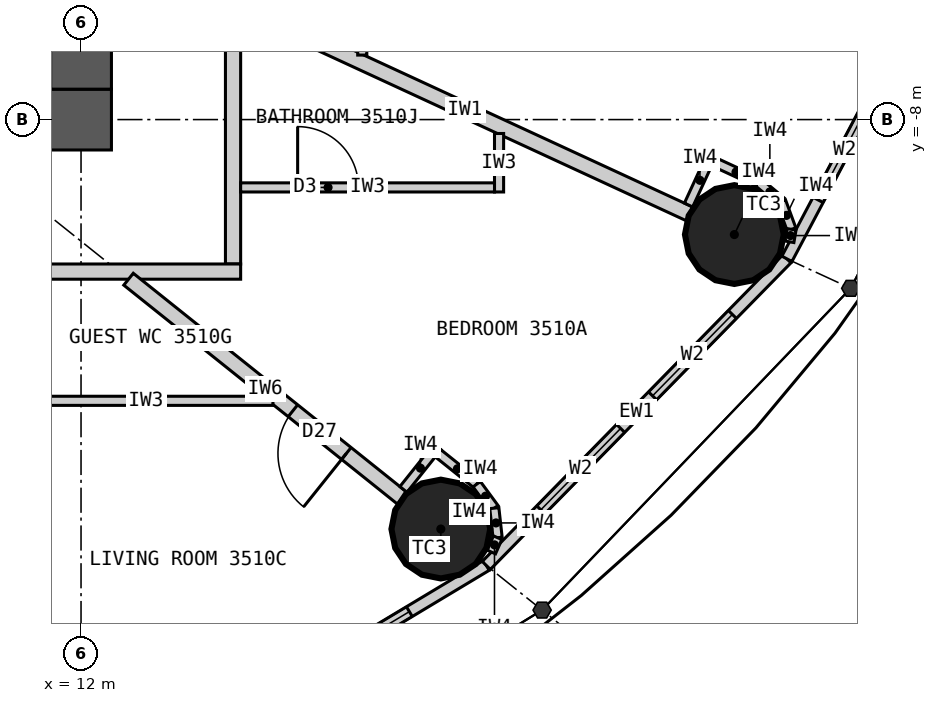
"""IFC4 building model, lengths in metres.
Left out: names, types, materials, properties, quantities, classifications, styles, units other than length and angle.
Written with IfcOpenShell. Run it as: python <this file> out.ifc"""

import sys

from ifc_helpers import new_model, si_unit, direction, frame, frame_2d, origin, origin_2d, place, context, subcontext, project, spatial, rectangle, circle, extrude, clip, halfspace, element, fill, save


model = new_model("IFC4")
c1 = context("Model", 3, precision=1e-05, world=origin(), true_north=direction((0.0, 1.0)))
c2 = subcontext(c1, "Body", "Model", "MODEL_VIEW")
j1 = project(units=[si_unit("LENGTHUNIT", "METRE"), si_unit("PLANEANGLEUNIT", "RADIAN")], contexts=[c1])
p1 = place(None, origin())
s1 = spatial("IfcSite", under=j1, at=p1, CompositionType="ELEMENT")
p2 = place(p1, origin())
s2 = spatial("IfcBuilding", under=s1, at=p2, CompositionType="ELEMENT")
p3 = place(p2, frame((0.0, 0.0, 135.3)))
s3 = spatial("IfcBuildingStorey", under=s2, at=p3, CompositionType="ELEMENT", Elevation=135.3)
for number, where, z_axis, x_axis in (
    (1, (16.734, -13.387, 0.0), (0.0, 0.0, 1.0), (1.0, 0.0, 0.0)),
    (2, (20.596, -9.513, 0.0), (0.0, 0.0, 1.0), (1.0, 0.0, 0.0)),
):
    element("IfcColumn", number, at=place(p3, frame(where, z_axis=z_axis, x_axis=x_axis)), inside=s3, PredefinedType="COLUMN", context=c2, shape_type="Clipping", body=[
        clip(extrude(circle(Radius=0.65, at=origin_2d()), origin(), (0.0, 0.0, 1.0), 3.3), halfspace(frame((0.0, 0.0, 2.25), z_axis=(0.0, 0.0, 1.0), x_axis=(1.0, 0.0, 0.0)), False)),
    ])
p4 = place(p3, frame((12.4, -8.0, 0.0), z_axis=(0.0, 0.0, 1.0), x_axis=(-1.0, 0.0, 0.0)))
e3 = element("IfcWall", 3, at=p4, inside=s3, PredefinedType="SHEAR", context=c2, shape_type="SweptSolid", body=[
    extrude(rectangle(XDim=24.8, YDim=0.8, at=frame_2d((12.4, 0.0))), origin(), (0.0, 0.0, 1.0), 3.3),
])
p5 = place(p4, frame((11.1, 0.0, 0.0)))
e4 = element("IfcOpeningElement", 4, at=p5, cuts=e3, PredefinedType="OPENING", context=c2, shape_type="SweptSolid", body=[
    extrude(rectangle(XDim=1.2, YDim=2.2, at=frame_2d((0.6, 1.1))), frame((0.0, 0.41, 0.0), z_axis=(0.0, -1.0, 0.0), x_axis=(1.0, 0.0, 0.0)), (0.0, 0.0, 1.0), 0.82),
])
p6 = place(p4, frame((18.7, 0.0, 0.0)))
e5 = element("IfcOpeningElement", 5, at=p6, cuts=e3, PredefinedType="OPENING", context=c2, shape_type="SweptSolid", body=[
    extrude(rectangle(XDim=0.9, YDim=2.2, at=frame_2d((0.45, 1.1))), frame((0.0, 0.41, 0.0), z_axis=(0.0, -1.0, 0.0), x_axis=(1.0, 0.0, 0.0)), (0.0, 0.0, 1.0), 0.82),
])
p7 = place(p3, frame((12.0, -7.6, 0.0), z_axis=(0.0, 0.0, 1.0), x_axis=(0.0, 1.0, 0.0)))
e6 = element("IfcWall", 6, at=p7, inside=s3, PredefinedType="SHEAR", context=c2, shape_type="SweptSolid", body=[
    extrude(rectangle(XDim=15.2, YDim=0.8, at=frame_2d((7.6, 0.0))), origin(), (0.0, 0.0, 1.0), 3.3),
])
p8 = place(p7, frame((6.7, 0.0, 0.0)))
e7 = element("IfcOpeningElement", 7, at=p8, cuts=e6, PredefinedType="OPENING", context=c2, shape_type="SweptSolid", body=[
    extrude(rectangle(XDim=1.8, YDim=2.2, at=frame_2d((0.9, 1.1))), frame((0.0, 0.41, 0.0), z_axis=(0.0, -1.0, 0.0), x_axis=(1.0, 0.0, 0.0)), (0.0, 0.0, 1.0), 0.82),
])
p9 = place(p3, frame((12.221, -16.935, 0.0), z_axis=(0.0, 0.0, 1.0), x_axis=(0.857308573723, 0.514802884044, 0.0)))
e8 = element("IfcWall", 8, at=p9, inside=s3, PredefinedType="ELEMENTEDWALL", context=c2, shape_type="SweptSolid", body=[
    extrude(rectangle(XDim=5.961, YDim=0.15, at=frame_2d((2.98, 0.0))), origin(), (0.0, 0.0, 1.0), 3.05),
])
p10 = place(p9, frame((1.181, 0.0, 0.9)))
e9 = element("IfcOpeningElement", 9, at=p10, cuts=e8, PredefinedType="OPENING", context=c2, shape_type="SweptSolid", body=[
    extrude(rectangle(XDim=1.5, YDim=1.9, at=frame_2d((0.75, 0.95))), frame((0.0, 0.085, 0.0), z_axis=(0.0, -1.0, 0.0), x_axis=(1.0, 0.0, 0.0)), (0.0, 0.0, 1.0), 0.17),
])
p11 = place(p9, frame((3.281, 0.0, 0.9)))
e10 = element("IfcOpeningElement", 10, at=p11, cuts=e8, PredefinedType="OPENING", context=c2, shape_type="SweptSolid", body=[
    extrude(rectangle(XDim=1.5, YDim=1.9, at=frame_2d((0.75, 0.95))), frame((0.0, 0.085, 0.0), z_axis=(0.0, -1.0, 0.0), x_axis=(1.0, 0.0, 0.0)), (0.0, 0.0, 1.0), 0.17),
])
p12 = place(p3, frame((17.332, -13.866, 0.0), z_axis=(0.0, 0.0, 1.0), x_axis=(0.700136650834, 0.714008872605, 0.0)))
e11 = element("IfcWall", 11, at=p12, inside=s3, PredefinedType="ELEMENTEDWALL", context=c2, shape_type="SweptSolid", body=[
    extrude(rectangle(XDim=5.649, YDim=0.15, at=frame_2d((2.825, 0.0))), origin(), (0.0, 0.0, 1.0), 3.05),
])
p13 = place(p12, frame((1.025, 0.0, 0.9)))
e12 = element("IfcOpeningElement", 12, at=p13, cuts=e11, PredefinedType="OPENING", context=c2, shape_type="SweptSolid", body=[
    extrude(rectangle(XDim=1.5, YDim=1.9, at=frame_2d((0.75, 0.95))), frame((0.0, 0.085, 0.0), z_axis=(0.0, -1.0, 0.0), x_axis=(1.0, 0.0, 0.0)), (0.0, 0.0, 1.0), 0.17),
])
p14 = place(p12, frame((3.125, 0.0, 0.9)))
e13 = element("IfcOpeningElement", 13, at=p14, cuts=e11, PredefinedType="OPENING", context=c2, shape_type="SweptSolid", body=[
    extrude(rectangle(XDim=1.5, YDim=1.9, at=frame_2d((0.75, 0.95))), frame((0.0, 0.085, 0.0), z_axis=(0.0, -1.0, 0.0), x_axis=(1.0, 0.0, 0.0)), (0.0, 0.0, 1.0), 0.17),
])
p15 = place(p3, frame((21.287, -9.832, 0.0), z_axis=(0.0, 0.0, 1.0), x_axis=(0.467814388454, 0.883826735257, 0.0)))
e14 = element("IfcWall", 14, at=p15, inside=s3, PredefinedType="ELEMENTEDWALL", context=c2, shape_type="SweptSolid", body=[
    extrude(rectangle(XDim=5.354, YDim=0.15, at=frame_2d((2.677, 0.0))), origin(), (0.0, 0.0, 1.0), 3.05),
])
p16 = place(p15, frame((0.877, 0.0, 0.9)))
e15 = element("IfcOpeningElement", 15, at=p16, cuts=e14, PredefinedType="OPENING", context=c2, shape_type="SweptSolid", body=[
    extrude(rectangle(XDim=1.5, YDim=1.9, at=frame_2d((0.75, 0.95))), frame((0.0, 0.085, 0.0), z_axis=(0.0, -1.0, 0.0), x_axis=(1.0, 0.0, 0.0)), (0.0, 0.0, 1.0), 0.17),
])
p17 = place(p15, frame((2.977, 0.0, 0.9)))
e16 = element("IfcOpeningElement", 16, at=p17, cuts=e14, PredefinedType="OPENING", context=c2, shape_type="SweptSolid", body=[
    extrude(rectangle(XDim=1.5, YDim=1.9, at=frame_2d((0.75, 0.95))), frame((0.0, 0.085, 0.0), z_axis=(0.0, -1.0, 0.0), x_axis=(1.0, 0.0, 0.0)), (0.0, 0.0, 1.0), 0.17),
])
p18 = place(p3, frame((14.0, -9.9, 0.0), z_axis=(0.0, 0.0, 1.0), x_axis=(0.0, 1.0, 0.0)))
e17 = element("IfcWall", 17, at=p18, inside=s3, PredefinedType="PARTITIONING", context=c2, shape_type="SweptSolid", body=[
    extrude(rectangle(XDim=19.8, YDim=0.2, at=frame_2d((9.9, 0.0))), origin(), (0.0, 0.0, 1.0), 3.05),
])
p19 = place(p18, frame((4.948, 0.0, 0.0)))
e18 = element("IfcOpeningElement", 18, at=p19, cuts=e17, PredefinedType="OPENING", context=c2, shape_type="SweptSolid", body=[
    extrude(rectangle(XDim=1.0, YDim=2.2, at=frame_2d((0.5, 1.1))), frame((0.0, 0.11, 0.0), z_axis=(0.0, -1.0, 0.0), x_axis=(1.0, 0.0, 0.0)), (0.0, 0.0, 1.0), 0.22),
])
p20 = place(p18, frame((18.641, 0.0, 0.0)))
e19 = element("IfcOpeningElement", 19, at=p20, cuts=e17, PredefinedType="OPENING", context=c2, shape_type="SweptSolid", body=[
    extrude(rectangle(XDim=1.0, YDim=2.2, at=frame_2d((0.5, 1.1))), frame((0.0, 0.11, 0.0), z_axis=(0.0, -1.0, 0.0), x_axis=(1.0, 0.0, 0.0)), (0.0, 0.0, 1.0), 0.22),
])
p21 = place(p3, frame((14.1, -10.0, 0.0), z_axis=(0.0, 0.0, 1.0), x_axis=(-1.0, 0.0, 0.0)))
e20 = element("IfcWall", 20, at=p21, inside=s3, PredefinedType="PARTITIONING", context=c2, shape_type="SweptSolid", body=[
    extrude(rectangle(XDim=28.2, YDim=0.2, at=frame_2d((14.1, 0.0))), origin(), (0.0, 0.0, 1.0), 3.05),
])
p22 = place(p21, frame((25.754, 0.0, 0.0)))
e21 = element("IfcOpeningElement", 21, at=p22, cuts=e20, PredefinedType="OPENING", context=c2, shape_type="SweptSolid", body=[
    extrude(rectangle(XDim=1.0, YDim=2.2, at=frame_2d((0.5, 1.1))), frame((0.0, 0.11, 0.0), z_axis=(0.0, -1.0, 0.0), x_axis=(1.0, 0.0, 0.0)), (0.0, 0.0, 1.0), 0.22),
])
p23 = place(p21, frame((18.029, 0.0, 0.0)))
e22 = element("IfcOpeningElement", 22, at=p23, cuts=e20, PredefinedType="OPENING", context=c2, shape_type="SweptSolid", body=[
    extrude(rectangle(XDim=1.0, YDim=2.2, at=frame_2d((0.5, 1.1))), frame((0.0, 0.11, 0.0), z_axis=(0.0, -1.0, 0.0), x_axis=(1.0, 0.0, 0.0)), (0.0, 0.0, 1.0), 0.22),
])
p24 = place(p21, frame((12.884, 0.0, 0.0)))
e23 = element("IfcOpeningElement", 23, at=p24, cuts=e20, PredefinedType="OPENING", context=c2, shape_type="SweptSolid", body=[
    extrude(rectangle(XDim=1.0, YDim=2.2, at=frame_2d((0.5, 1.1))), frame((0.0, 0.11, 0.0), z_axis=(0.0, -1.0, 0.0), x_axis=(1.0, 0.0, 0.0)), (0.0, 0.0, 1.0), 0.22),
])
p25 = place(p21, frame((9.075, 0.0, 0.0)))
e24 = element("IfcOpeningElement", 24, at=p25, cuts=e20, PredefinedType="OPENING", context=c2, shape_type="SweptSolid", body=[
    extrude(rectangle(XDim=1.0, YDim=2.2, at=frame_2d((0.5, 1.1))), frame((0.0, 0.11, 0.0), z_axis=(0.0, -1.0, 0.0), x_axis=(1.0, 0.0, 0.0)), (0.0, 0.0, 1.0), 0.22),
])
p26 = place(p21, frame((3.59, 0.0, 0.0)))
e25 = element("IfcOpeningElement", 25, at=p26, cuts=e20, PredefinedType="OPENING", context=c2, shape_type="SweptSolid", body=[
    extrude(rectangle(XDim=1.0, YDim=2.2, at=frame_2d((0.5, 1.1))), frame((0.0, 0.11, 0.0), z_axis=(0.0, -1.0, 0.0), x_axis=(1.0, 0.0, 0.0)), (0.0, 0.0, 1.0), 0.22),
])
p27 = place(p3, frame((12.625, -10.1, 0.0), z_axis=(0.0, 0.0, 1.0), x_axis=(0.780863644897, -0.624701503182, 0.0)))
e26 = element("IfcWall", 26, at=p27, inside=s3, PredefinedType="PARTITIONING", context=c2, shape_type="SweptSolid", body=[
    extrude(rectangle(XDim=4.612, YDim=0.2, at=frame_2d((2.306, 0.0))), origin(), (0.0, 0.0, 1.0), 2.15),
])
p28 = place(p27, frame((2.77, 0.0, 0.0)))
e27 = element("IfcOpeningElement", 27, at=p28, cuts=e26, PredefinedType="OPENING", context=c2, shape_type="SweptSolid", body=[
    extrude(rectangle(XDim=0.9, YDim=2.1, at=frame_2d((0.45, 1.05))), frame((0.0, 0.11, 0.0), z_axis=(0.0, -1.0, 0.0), x_axis=(1.0, 0.0, 0.0)), (0.0, 0.0, 1.0), 0.22),
])
p29 = place(p3, frame((14.1, -6.512, 0.0), z_axis=(0.0, 0.0, 1.0), x_axis=(0.907833019998, -0.419331858797, 0.0)))
e28 = element("IfcWall", 28, at=p29, inside=s3, PredefinedType="PARTITIONING", context=c2, shape_type="SweptSolid", body=[
    extrude(rectangle(XDim=6.505, YDim=0.2, at=frame_2d((3.252, 0.0))), origin(), (0.0, 0.0, 1.0), 2.15),
])
p30 = place(p3, frame((14.525, -11.7, 0.0), z_axis=(0.0, 0.0, 1.0), x_axis=(-1.0, 0.0, 0.0)))
e29 = element("IfcWall", 29, at=p30, inside=s3, PredefinedType="PARTITIONING", context=c2, shape_type="SweptSolid", body=[
    extrude(rectangle(XDim=3.34, YDim=0.12, at=frame_2d((1.67, 0.0))), origin(), (0.0, 0.0, 1.0), 3.05),
])
p31 = place(p3, frame((17.5, -8.183, 0.0), z_axis=(0.0, 0.0, 1.0), x_axis=(0.0, -1.0, 0.0)))
e30 = element("IfcWall", 30, at=p31, inside=s3, PredefinedType="PARTITIONING", context=c2, shape_type="SweptSolid", body=[
    extrude(rectangle(XDim=0.77, YDim=0.12, at=frame_2d((0.385, 0.0))), origin(), (0.0, 0.0, 1.0), 3.05),
])
p32 = place(p3, frame((14.1, -8.893, 0.0), z_axis=(0.0, 0.0, 1.0), x_axis=(1.0, 0.0, 0.0)))
e31 = element("IfcWall", 31, at=p32, inside=s3, PredefinedType="PARTITIONING", context=c2, shape_type="SweptSolid", body=[
    extrude(rectangle(XDim=3.34, YDim=0.12, at=frame_2d((1.67, 0.0))), origin(), (0.0, 0.0, 1.0), 3.05),
])
p33 = place(p32, frame((0.75, 0.0, 0.0)))
e32 = element("IfcOpeningElement", 32, at=p33, cuts=e31, PredefinedType="OPENING", context=c2, shape_type="SweptSolid", body=[
    extrude(rectangle(XDim=0.8, YDim=2.1, at=frame_2d((0.4, 1.05))), frame((0.0, 0.07, 0.0), z_axis=(0.0, -1.0, 0.0), x_axis=(1.0, 0.0, 0.0)), (0.0, 0.0, 1.0), 0.14),
])
p34 = place(p3, frame((15.7, -7.152, 0.0), z_axis=(0.0, 0.0, 1.0), x_axis=(0.0, 1.0, 0.0)))
e33 = element("IfcWall", 33, at=p34, inside=s3, PredefinedType="PARTITIONING", context=c2, shape_type="SweptSolid", body=[
    extrude(rectangle(XDim=2.079, YDim=0.12, at=frame_2d((1.04, 0.0))), origin(), (0.0, 0.0, 1.0), 3.05),
])
p35 = place(p3, frame((16.242, -12.865, 0.0), z_axis=(0.0, 0.0, 1.0), x_axis=(0.624861414622, 0.780735686719, 0.0)))
e34 = element("IfcWall", 34, at=p35, inside=s3, PredefinedType="PARTITIONING", context=c2, shape_type="SweptSolid", body=[
    extrude(rectangle(XDim=0.716, YDim=0.12, at=frame_2d((0.358, 0.0))), origin(), (0.0, 0.0, 1.0), 3.05),
])
p36 = place(p3, frame((16.698, -12.391, 0.0), z_axis=(0.0, 0.0, 1.0), x_axis=(0.780722240533, -0.624878214645, 0.0)))
e35 = element("IfcWall", 35, at=p36, inside=s3, PredefinedType="PARTITIONING", context=c2, shape_type="SweptSolid", body=[
    extrude(rectangle(XDim=0.65, YDim=0.12, at=frame_2d((0.325, 0.0))), origin(), (0.0, 0.0, 1.0), 3.05),
])
p37 = place(p3, frame((17.206, -12.797, 0.0), z_axis=(0.0, 0.0, 1.0), x_axis=(0.592986095904, -0.805212698648, 0.0)))
e36 = element("IfcWall", 36, at=p37, inside=s3, PredefinedType="PARTITIONING", context=c2, shape_type="SweptSolid", body=[
    extrude(rectangle(XDim=0.391, YDim=0.12, at=frame_2d((0.196, 0.0))), origin(), (0.0, 0.0, 1.0), 3.05),
])
p38 = place(p3, frame((17.438, -13.112, 0.0), z_axis=(0.0, 0.0, 1.0), x_axis=(0.109815164188, -0.993952025862, 0.0)))
e37 = element("IfcWall", 37, at=p38, inside=s3, PredefinedType="PARTITIONING", context=c2, shape_type="SweptSolid", body=[
    extrude(rectangle(XDim=0.391, YDim=0.12, at=frame_2d((0.196, 0.0))), origin(), (0.0, 0.0, 1.0), 3.05),
])
p39 = place(p3, frame((17.481, -13.501, 0.0), z_axis=(0.0, 0.0, 1.0), x_axis=(-0.401504188288, -0.915857186895, 0.0)))
e38 = element("IfcWall", 38, at=p39, inside=s3, PredefinedType="PARTITIONING", context=c2, shape_type="SweptSolid", body=[
    extrude(rectangle(XDim=0.206, YDim=0.12, at=frame_2d((0.103, 0.0))), origin(), (0.0, 0.0, 1.0), 3.05),
])
p40 = place(p3, frame((19.993, -9.124, 0.0), z_axis=(0.0, 0.0, 1.0), x_axis=(0.419447394118, 0.90777964483, 0.0)))
e39 = element("IfcWall", 39, at=p40, inside=s3, PredefinedType="PARTITIONING", context=c2, shape_type="SweptSolid", body=[
    extrude(rectangle(XDim=0.716, YDim=0.12, at=frame_2d((0.358, 0.0))), origin(), (0.0, 0.0, 1.0), 3.05),
])
p41 = place(p3, frame((20.323, -8.554, 0.0), z_axis=(0.0, 0.0, 1.0), x_axis=(0.907750418698, -0.419510640333, 0.0)))
e40 = element("IfcWall", 40, at=p41, inside=s3, PredefinedType="PARTITIONING", context=c2, shape_type="SweptSolid", body=[
    extrude(rectangle(XDim=0.65, YDim=0.12, at=frame_2d((0.325, 0.0))), origin(), (0.0, 0.0, 1.0), 3.05),
])
p42 = place(p3, frame((20.913, -8.827, 0.0), z_axis=(0.0, 0.0, 1.0), x_axis=(0.76847706684, -0.639877330229, 0.0)))
e41 = element("IfcWall", 41, at=p42, inside=s3, PredefinedType="PARTITIONING", context=c2, shape_type="SweptSolid", body=[
    extrude(rectangle(XDim=0.391, YDim=0.12, at=frame_2d((0.196, 0.0))), origin(), (0.0, 0.0, 1.0), 3.05),
])
p43 = place(p3, frame((21.213, -9.077, 0.0), z_axis=(0.0, 0.0, 1.0), x_axis=(0.345647532133, -0.938364419365, 0.0)))
e42 = element("IfcWall", 42, at=p43, inside=s3, PredefinedType="PARTITIONING", context=c2, shape_type="SweptSolid", body=[
    extrude(rectangle(XDim=0.391, YDim=0.12, at=frame_2d((0.196, 0.0))), origin(), (0.0, 0.0, 1.0), 3.05),
])
p44 = place(p3, frame((21.348, -9.444, 0.0), z_axis=(0.0, 0.0, 1.0), x_axis=(-0.170349493321, -0.985383707053, 0.0)))
e43 = element("IfcWall", 43, at=p44, inside=s3, PredefinedType="PARTITIONING", context=c2, shape_type="SweptSolid", body=[
    extrude(rectangle(XDim=0.166, YDim=0.12, at=frame_2d((0.083, 0.0))), origin(), (0.0, 0.0, 1.0), 3.05),
])
p45 = place(p11, origin())
e44 = element("IfcWindow", 44, at=p45, inside=s3, PartitioningType="SINGLE_PANEL", PredefinedType="WINDOW", context=c2, shape_type="SweptSolid", body=[
    extrude(rectangle(XDim=1.5, YDim=1.9, at=frame_2d((0.75, 0.95))), frame((0.0, 0.03, 0.0), z_axis=(0.0, -1.0, 0.0), x_axis=(1.0, 0.0, 0.0)), (0.0, 0.0, 1.0), 0.06),
])
fill(e10, e44)
p46 = place(p13, origin())
e45 = element("IfcWindow", 45, at=p46, inside=s3, PartitioningType="SINGLE_PANEL", PredefinedType="WINDOW", context=c2, shape_type="SweptSolid", body=[
    extrude(rectangle(XDim=1.5, YDim=1.9, at=frame_2d((0.75, 0.95))), frame((0.0, 0.03, 0.0), z_axis=(0.0, -1.0, 0.0), x_axis=(1.0, 0.0, 0.0)), (0.0, 0.0, 1.0), 0.06),
])
fill(e12, e45)
p47 = place(p14, origin())
e46 = element("IfcWindow", 46, at=p47, inside=s3, PartitioningType="SINGLE_PANEL", PredefinedType="WINDOW", context=c2, shape_type="SweptSolid", body=[
    extrude(rectangle(XDim=1.5, YDim=1.9, at=frame_2d((0.75, 0.95))), frame((0.0, 0.03, 0.0), z_axis=(0.0, -1.0, 0.0), x_axis=(1.0, 0.0, 0.0)), (0.0, 0.0, 1.0), 0.06),
])
fill(e13, e46)
p48 = place(p16, origin())
e47 = element("IfcWindow", 47, at=p48, inside=s3, PartitioningType="SINGLE_PANEL", PredefinedType="WINDOW", context=c2, shape_type="SweptSolid", body=[
    extrude(rectangle(XDim=1.5, YDim=1.9, at=frame_2d((0.75, 0.95))), frame((0.0, 0.03, 0.0), z_axis=(0.0, -1.0, 0.0), x_axis=(1.0, 0.0, 0.0)), (0.0, 0.0, 1.0), 0.06),
])
fill(e15, e47)
p49 = place(p33, origin())
e48 = element("IfcDoor", 48, at=p49, inside=s3, OperationType="SINGLE_SWING_LEFT", PredefinedType="DOOR", context=c2, shape_type="SweptSolid", body=[
    extrude(rectangle(XDim=0.8, YDim=2.1, at=frame_2d((0.4, 1.05))), frame((0.0, 0.025, 0.0), z_axis=(0.0, -1.0, 0.0), x_axis=(1.0, 0.0, 0.0)), (0.0, 0.0, 1.0), 0.05),
])
fill(e32, e48)
p50 = place(p28, origin())
e49 = element("IfcDoor", 49, at=p50, inside=s3, OperationType="SINGLE_SWING_RIGHT", PredefinedType="DOOR", context=c2, shape_type="SweptSolid", body=[
    extrude(rectangle(XDim=0.9, YDim=2.1, at=frame_2d((0.45, 1.05))), frame((0.0, 0.025, 0.0), z_axis=(0.0, -1.0, 0.0), x_axis=(1.0, 0.0, 0.0)), (0.0, 0.0, 1.0), 0.05),
])
fill(e27, e49)
save(model, sys.argv[1])
